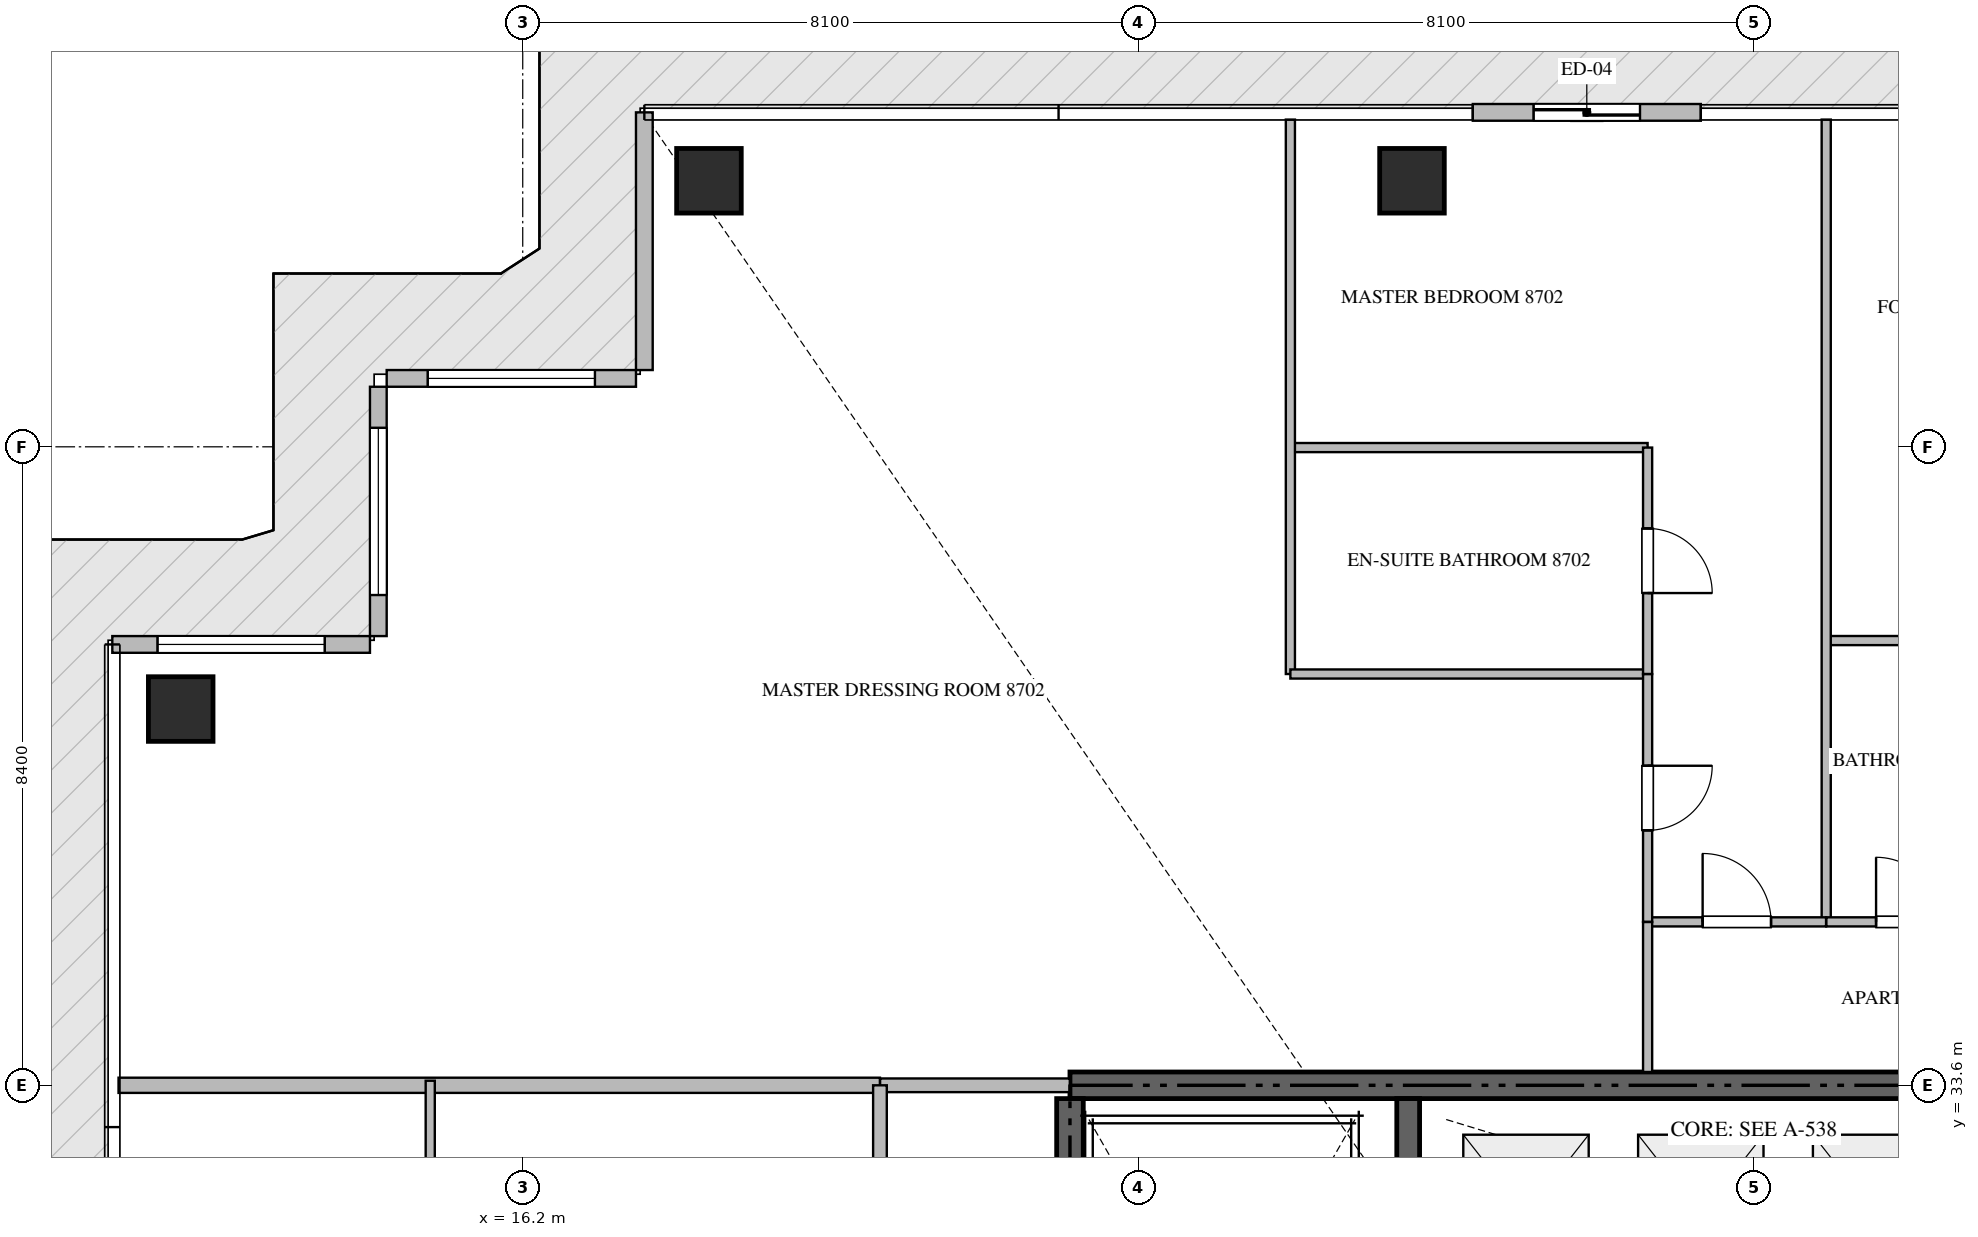
"""IFC4 building model, lengths in metres.
Left out: names, types, materials, properties, quantities, classifications, styles, units other than length and angle.
Written with IfcOpenShell. Run it as: python <this file> out.ifc"""

import sys

from ifc_helpers import new_model, si_unit, direction, frame, frame_2d, origin, origin_2d, place, context, subcontext, project, spatial, rectangle, extrude, source, transform, mapped, element, fill, save


model = new_model("IFC4")
c1 = context("Model", 3, precision=1e-05, world=origin(), true_north=direction((0.0, 1.0)))
c2 = subcontext(c1, "Body", "Model", "MODEL_VIEW")
j1 = project(units=[si_unit("LENGTHUNIT", "METRE"), si_unit("PLANEANGLEUNIT", "RADIAN")], contexts=[c1])
p1 = place(None, origin())
s1 = spatial("IfcSite", under=j1, at=p1, CompositionType="ELEMENT")
p2 = place(p1, origin())
s2 = spatial("IfcBuilding", under=s1, at=p2, CompositionType="ELEMENT")
p3 = place(p2, frame((0.0, 0.0, 353.85)))
s3 = spatial("IfcBuildingStorey", under=s2, at=p3, CompositionType="ELEMENT", Elevation=353.85)
p4 = place(p3, frame((41.4, 33.6, -0.26), z_axis=(0.0, 0.0, 1.0), x_axis=(-1.0, 0.0, 0.0)))
e1 = element("IfcWall", 1, at=p4, inside=s3, PredefinedType="SHEAR", context=c2, shape_type="SweptSolid", body=[
    extrude(rectangle(XDim=18.0, YDim=0.35, at=frame_2d((9.0, 0.0))), origin(), (0.0, 0.0, 1.0), 5.798),
])
p5 = place(p3, frame((23.4, 24.25, -0.26), z_axis=(0.0, 0.0, 1.0), x_axis=(0.0, 1.0, 0.0)))
e2 = element("IfcWall", 2, at=p5, inside=s3, PredefinedType="SHEAR", context=c2, shape_type="SweptSolid", body=[
    extrude(rectangle(XDim=9.175, YDim=0.35, at=frame_2d((4.587, 0.0))), origin(), (0.0, 0.0, 1.0), 5.798),
])
p6 = place(p3, frame((27.85, 23.55, -0.26), z_axis=(0.0, 0.0, 1.0), x_axis=(0.0, 1.0, 0.0)))
e3 = element("IfcWall", 3, at=p6, inside=s3, PredefinedType="SHEAR", context=c2, shape_type="SweptSolid", body=[
    extrude(rectangle(XDim=9.875, YDim=0.3, at=frame_2d((4.938, 0.0))), origin(), (0.0, 0.0, 1.0), 5.798),
])
m1 = source(origin(), c2, "Body", "SweptSolid", [
    extrude(rectangle(XDim=0.85, YDim=0.85, at=origin_2d()), origin(), (0.0, 0.0, 1.0), 5.8),
])
for number, where, z_axis, x_axis in (
    (4, (18.65, 45.5, -0.26), (0.0, 0.0, 1.0), (1.0, 0.0, 0.0)),
    (5, (27.9, 45.5, -0.26), (0.0, 0.0, 1.0), (1.0, 0.0, 0.0)),
    (6, (11.7, 38.55, -0.26), (0.0, 0.0, 1.0), (1.0, 0.0, 0.0)),
):
    element("IfcColumn", number, at=place(p3, frame(where, z_axis=z_axis, x_axis=x_axis)), inside=s3, PredefinedType="COLUMN", context=c2, shape_type="MappedRepresentation", body=[
        mapped(m1, transform((0.0, 0.0, 0.0), scale=1.0)),
    ])
p7 = place(p3, frame((31.7, 46.4, 0.0), z_axis=(0.0, 0.0, 1.0), x_axis=(-1.0, 0.0, 0.0)))
e7 = element("IfcWall", 7, at=p7, inside=s3, PredefinedType="ELEMENTEDWALL", context=c2, shape_type="SweptSolid", body=[
    extrude(rectangle(XDim=3.0, YDim=0.22, at=frame_2d((1.5, 0.0))), origin(), (0.0, 0.0, 1.0), 5.525),
])
p8 = place(p7, frame((0.8, 0.0, 0.0)))
e8 = element("IfcOpeningElement", 8, at=p8, cuts=e7, PredefinedType="OPENING", context=c2, shape_type="SweptSolid", body=[
    extrude(rectangle(XDim=1.4, YDim=2.25, at=frame_2d((0.7, 1.125))), frame((0.0, 0.12, 0.0), z_axis=(0.0, -1.0, 0.0), x_axis=(1.0, 0.0, 0.0)), (0.0, 0.0, 1.0), 0.24),
])
p9 = place(p3, frame((17.8, 46.4, 0.0), z_axis=(0.0, 0.0, 1.0), x_axis=(0.0, -1.0, 0.0)))
e9 = element("IfcWall", 9, at=p9, inside=s3, PredefinedType="ELEMENTEDWALL", context=c2, shape_type="SweptSolid", body=[
    extrude(rectangle(XDim=3.39, YDim=0.22, at=frame_2d((1.695, 0.0))), origin(), (0.0, 0.0, 1.0), 5.525),
])
p10 = place(p3, frame((17.69, 42.9, 0.0), z_axis=(0.0, 0.0, 1.0), x_axis=(-1.0, 0.0, 0.0)))
e10 = element("IfcWall", 10, at=p10, inside=s3, PredefinedType="ELEMENTEDWALL", context=c2, shape_type="SweptSolid", body=[
    extrude(rectangle(XDim=3.28, YDim=0.22, at=frame_2d((1.64, 0.0))), origin(), (0.0, 0.0, 1.0), 5.525),
])
p11 = place(p10, frame((0.54, 0.0, 0.65)))
e11 = element("IfcOpeningElement", 11, at=p11, cuts=e10, PredefinedType="OPENING", context=c2, shape_type="SweptSolid", body=[
    extrude(rectangle(XDim=2.2, YDim=2.4, at=frame_2d((1.1, 1.2))), frame((0.0, 0.12, 0.0), z_axis=(0.0, -1.0, 0.0), x_axis=(1.0, 0.0, 0.0)), (0.0, 0.0, 1.0), 0.24),
])
p12 = place(p3, frame((14.3, 42.79, 0.0), z_axis=(0.0, 0.0, 1.0), x_axis=(0.0, -1.0, 0.0)))
e12 = element("IfcWall", 12, at=p12, inside=s3, PredefinedType="ELEMENTEDWALL", context=c2, shape_type="SweptSolid", body=[
    extrude(rectangle(XDim=3.28, YDim=0.22, at=frame_2d((1.64, 0.0))), origin(), (0.0, 0.0, 1.0), 5.525),
])
p13 = place(p12, frame((0.54, 0.0, 0.65)))
e13 = element("IfcOpeningElement", 13, at=p13, cuts=e12, PredefinedType="OPENING", context=c2, shape_type="SweptSolid", body=[
    extrude(rectangle(XDim=2.2, YDim=2.4, at=frame_2d((1.1, 1.2))), frame((0.0, 0.12, 0.0), z_axis=(0.0, -1.0, 0.0), x_axis=(1.0, 0.0, 0.0)), (0.0, 0.0, 1.0), 0.24),
])
p14 = place(p3, frame((14.19, 39.4, 0.0), z_axis=(0.0, 0.0, 1.0), x_axis=(-1.0, 0.0, 0.0)))
e14 = element("IfcWall", 14, at=p14, inside=s3, PredefinedType="ELEMENTEDWALL", context=c2, shape_type="SweptSolid", body=[
    extrude(rectangle(XDim=3.39, YDim=0.22, at=frame_2d((1.695, 0.0))), origin(), (0.0, 0.0, 1.0), 5.525),
])
p15 = place(p14, frame((0.595, 0.0, 0.65)))
e15 = element("IfcOpeningElement", 15, at=p15, cuts=e14, PredefinedType="OPENING", context=c2, shape_type="SweptSolid", body=[
    extrude(rectangle(XDim=2.2, YDim=2.4, at=frame_2d((1.1, 1.2))), frame((0.0, 0.12, 0.0), z_axis=(0.0, -1.0, 0.0), x_axis=(1.0, 0.0, 0.0)), (0.0, 0.0, 1.0), 0.24),
])
p16 = place(p3, frame((10.882, 33.6, 0.0), z_axis=(0.0, 0.0, 1.0), x_axis=(1.0, 0.0, 0.0)))
e16 = element("IfcWall", 16, at=p16, inside=s3, PredefinedType="PARTITIONING", context=c2, shape_type="SweptSolid", body=[
    extrude(rectangle(XDim=10.018, YDim=0.2, at=frame_2d((5.009, 0.0))), origin(), (0.0, 0.0, 1.0), 5.54),
])
p17 = place(p3, frame((20.902, 33.6, 0.0), z_axis=(0.0, 0.0, 1.0), x_axis=(1.0, 0.0, 0.0)))
e17 = element("IfcWall", 17, at=p17, inside=s3, PredefinedType="PARTITIONING", context=c2, shape_type="SweptSolid", body=[
    extrude(rectangle(XDim=2.496, YDim=0.18, at=frame_2d((1.248, 0.0))), origin(), (0.0, 0.0, 1.0), 5.54),
])
p18 = place(p3, frame((20.9, 16.8, 0.0), z_axis=(0.0, 0.0, 1.0), x_axis=(0.0, 1.0, 0.0)))
e18 = element("IfcWall", 18, at=p18, inside=s3, PredefinedType="PARTITIONING", context=c2, shape_type="SweptSolid", body=[
    extrude(rectangle(XDim=16.8, YDim=0.18, at=frame_2d((8.4, 0.0))), origin(), (0.0, 0.0, 1.0), 5.54),
])
p19 = place(p18, frame((1.3, 0.0, 0.0)))
e19 = element("IfcOpeningElement", 19, at=p19, cuts=e18, PredefinedType="OPENING", context=c2, shape_type="SweptSolid", body=[
    extrude(rectangle(XDim=1.0, YDim=2.15, at=frame_2d((0.5, 1.075))), frame((0.0, 0.1, 0.0), z_axis=(0.0, -1.0, 0.0), x_axis=(1.0, 0.0, 0.0)), (0.0, 0.0, 1.0), 0.2),
])
p20 = place(p3, frame((33.35, 39.451, 0.0), z_axis=(0.0, 0.0, 1.0), x_axis=(1.0, 0.0, 0.0)))
e20 = element("IfcWall", 20, at=p20, inside=s3, PredefinedType="PARTITIONING", context=c2, shape_type="SweptSolid", body=[
    extrude(rectangle(XDim=5.15, YDim=0.12, at=frame_2d((2.575, 0.0))), origin(), (0.0, 0.0, 1.0), 5.54),
])
p21 = place(p3, frame((33.35, 46.305, 0.0), z_axis=(0.0, 0.0, 1.0), x_axis=(0.0, -1.0, 0.0)))
e21 = element("IfcWall", 21, at=p21, inside=s3, PredefinedType="PARTITIONING", context=c2, shape_type="SweptSolid", body=[
    extrude(rectangle(XDim=10.555, YDim=0.12, at=frame_2d((5.277, 0.0))), origin(), (0.0, 0.0, 1.0), 5.54),
])
p22 = place(p3, frame((33.35, 35.75, 0.0), z_axis=(0.0, 0.0, 1.0), x_axis=(1.0, 0.0, 0.0)))
e22 = element("IfcWall", 22, at=p22, inside=s3, PredefinedType="PARTITIONING", context=c2, shape_type="SweptSolid", body=[
    extrude(rectangle(XDim=2.163, YDim=0.12, at=frame_2d((1.082, 0.0))), origin(), (0.0, 0.0, 1.0), 5.54),
])
p23 = place(p22, frame((0.656, 0.0, 0.0)))
e23 = element("IfcOpeningElement", 23, at=p23, cuts=e22, PredefinedType="OPENING", context=c2, shape_type="SweptSolid", body=[
    extrude(rectangle(XDim=0.85, YDim=2.1, at=frame_2d((0.425, 1.05))), frame((0.0, 0.07, 0.0), z_axis=(0.0, -1.0, 0.0), x_axis=(1.0, 0.0, 0.0)), (0.0, 0.0, 1.0), 0.14),
])
p24 = place(p3, frame((31.0, 35.75, 0.0), z_axis=(0.0, 0.0, 1.0), x_axis=(1.0, 0.0, 0.0)))
e24 = element("IfcWall", 24, at=p24, inside=s3, PredefinedType="PARTITIONING", context=c2, shape_type="SweptSolid", body=[
    extrude(rectangle(XDim=2.348, YDim=0.12, at=frame_2d((1.174, 0.0))), origin(), (0.0, 0.0, 1.0), 5.54),
])
p25 = place(p24, frame((0.724, 0.0, 0.0)))
e25 = element("IfcOpeningElement", 25, at=p25, cuts=e24, PredefinedType="OPENING", context=c2, shape_type="SweptSolid", body=[
    extrude(rectangle(XDim=0.9, YDim=2.1, at=frame_2d((0.45, 1.05))), frame((0.0, 0.07, 0.0), z_axis=(0.0, -1.0, 0.0), x_axis=(1.0, 0.0, 0.0)), (0.0, 0.0, 1.0), 0.14),
])
p26 = place(p3, frame((26.3, 41.99, 0.0), z_axis=(0.0, 0.0, 1.0), x_axis=(1.0, 0.0, 0.0)))
e26 = element("IfcWall", 26, at=p26, inside=s3, PredefinedType="PARTITIONING", context=c2, shape_type="SweptSolid", body=[
    extrude(rectangle(XDim=4.7, YDim=0.12, at=frame_2d((2.35, 0.0))), origin(), (0.0, 0.0, 1.0), 5.54),
])
p27 = place(p3, frame((26.3, 46.305, 0.0), z_axis=(0.0, 0.0, 1.0), x_axis=(0.0, -1.0, 0.0)))
e27 = element("IfcWall", 27, at=p27, inside=s3, PredefinedType="PARTITIONING", context=c2, shape_type="SweptSolid", body=[
    extrude(rectangle(XDim=7.294, YDim=0.12, at=frame_2d((3.647, 0.0))), origin(), (0.0, 0.0, 1.0), 5.54),
])
p28 = place(p3, frame((26.3, 39.011, 0.0), z_axis=(0.0, 0.0, 1.0), x_axis=(1.0, 0.0, 0.0)))
e28 = element("IfcWall", 28, at=p28, inside=s3, PredefinedType="PARTITIONING", context=c2, shape_type="SweptSolid", body=[
    extrude(rectangle(XDim=4.7, YDim=0.12, at=frame_2d((2.35, 0.0))), origin(), (0.0, 0.0, 1.0), 5.54),
])
p29 = place(p3, frame((31.0, 41.99, 0.0), z_axis=(0.0, 0.0, 1.0), x_axis=(0.0, -1.0, 0.0)))
e29 = element("IfcWall", 29, at=p29, inside=s3, PredefinedType="PARTITIONING", context=c2, shape_type="SweptSolid", body=[
    extrude(rectangle(XDim=2.979, YDim=0.12, at=frame_2d((1.49, 0.0))), origin(), (0.0, 0.0, 1.0), 5.54),
])
p30 = place(p29, frame((1.064, 0.0, 0.0)))
e30 = element("IfcOpeningElement", 30, at=p30, cuts=e29, PredefinedType="OPENING", context=c2, shape_type="SweptSolid", body=[
    extrude(rectangle(XDim=0.85, YDim=2.1, at=frame_2d((0.425, 1.05))), frame((0.0, 0.07, 0.0), z_axis=(0.0, -1.0, 0.0), x_axis=(1.0, 0.0, 0.0)), (0.0, 0.0, 1.0), 0.14),
])
p31 = place(p3, frame((31.0, 39.009, 0.0), z_axis=(0.0, 0.0, 1.0), x_axis=(0.0, -1.0, 0.0)))
e31 = element("IfcWall", 31, at=p31, inside=s3, PredefinedType="PARTITIONING", context=c2, shape_type="SweptSolid", body=[
    extrude(rectangle(XDim=3.259, YDim=0.12, at=frame_2d((1.629, 0.0))), origin(), (0.0, 0.0, 1.0), 5.54),
])
p32 = place(p31, frame((1.205, 0.0, 0.0)))
e32 = element("IfcOpeningElement", 32, at=p32, cuts=e31, PredefinedType="OPENING", context=c2, shape_type="SweptSolid", body=[
    extrude(rectangle(XDim=0.85, YDim=2.1, at=frame_2d((0.425, 1.05))), frame((0.0, 0.07, 0.0), z_axis=(0.0, -1.0, 0.0), x_axis=(1.0, 0.0, 0.0)), (0.0, 0.0, 1.0), 0.14),
])
p33 = place(p3, frame((31.0, 35.748, 0.0), z_axis=(0.0, 0.0, 1.0), x_axis=(0.0, -1.0, 0.0)))
e33 = element("IfcWall", 33, at=p33, inside=s3, PredefinedType="PARTITIONING", context=c2, shape_type="SweptSolid", body=[
    extrude(rectangle(XDim=1.973, YDim=0.12, at=frame_2d((0.987, 0.0))), origin(), (0.0, 0.0, 1.0), 5.54),
])
p34 = place(p3, frame((14.983, 23.18, 0.0), z_axis=(0.0, 0.0, 1.0), x_axis=(0.0, 1.0, 0.0)))
e34 = element("IfcWall", 34, at=p34, inside=s3, PredefinedType="PARTITIONING", context=c2, shape_type="SweptSolid", body=[
    extrude(rectangle(XDim=10.48, YDim=0.12, at=frame_2d((5.24, 0.0))), origin(), (0.0, 0.0, 1.0), 5.54),
])
m2 = source(origin(), c2, "Body", "SweptSolid", [
    extrude(rectangle(XDim=1.4, YDim=2.25, at=frame_2d((0.7, 1.125))), frame((0.0, 0.025, 0.0), z_axis=(0.0, -1.0, 0.0), x_axis=(1.0, 0.0, 0.0)), (0.0, 0.0, 1.0), 0.05),
])
p35 = place(p8, origin())
e35 = element("IfcDoor", 35, at=p35, inside=s3, OperationType="SLIDING_TO_LEFT", PredefinedType="DOOR", context=c2, shape_type="MappedRepresentation", body=[
    mapped(m2, transform((0.0, 0.0, 0.0), scale=1.0)),
])
fill(e8, e35)
m3 = source(origin(), c2, "Body", "SweptSolid", [
    extrude(rectangle(XDim=2.2, YDim=2.4, at=frame_2d((1.1, 1.2))), frame((0.0, 0.03, 0.0), z_axis=(0.0, -1.0, 0.0), x_axis=(1.0, 0.0, 0.0)), (0.0, 0.0, 1.0), 0.06),
])
p36 = place(p11, origin())
e36 = element("IfcWindow", 36, at=p36, inside=s3, PartitioningType="SINGLE_PANEL", PredefinedType="WINDOW", context=c2, shape_type="MappedRepresentation", body=[
    mapped(m3, transform((0.0, 0.0, 0.0), scale=1.0)),
])
fill(e11, e36)
p37 = place(p13, origin())
e37 = element("IfcWindow", 37, at=p37, inside=s3, PartitioningType="SINGLE_PANEL", PredefinedType="WINDOW", context=c2, shape_type="MappedRepresentation", body=[
    mapped(m3, transform((0.0, 0.0, 0.0), scale=1.0)),
])
fill(e13, e37)
p38 = place(p15, origin())
e38 = element("IfcWindow", 38, at=p38, inside=s3, PartitioningType="SINGLE_PANEL", PredefinedType="WINDOW", context=c2, shape_type="MappedRepresentation", body=[
    mapped(m3, transform((0.0, 0.0, 0.0), scale=1.0)),
])
fill(e15, e38)
m4 = source(origin(), c2, "Body", "SweptSolid", [
    extrude(rectangle(XDim=0.85, YDim=2.1, at=frame_2d((0.425, 1.05))), frame((0.0, 0.025, 0.0), z_axis=(0.0, -1.0, 0.0), x_axis=(1.0, 0.0, 0.0)), (0.0, 0.0, 1.0), 0.05),
])
p39 = place(p23, origin())
e39 = element("IfcDoor", 39, at=p39, inside=s3, OperationType="SINGLE_SWING_LEFT", PredefinedType="DOOR", context=c2, shape_type="MappedRepresentation", body=[
    mapped(m4, transform((0.0, 0.0, 0.0), scale=1.0)),
])
fill(e23, e39)
m5 = source(origin(), c2, "Body", "SweptSolid", [
    extrude(rectangle(XDim=0.9, YDim=2.1, at=frame_2d((0.45, 1.05))), frame((0.0, 0.025, 0.0), z_axis=(0.0, -1.0, 0.0), x_axis=(1.0, 0.0, 0.0)), (0.0, 0.0, 1.0), 0.05),
])
p40 = place(p25, origin())
e40 = element("IfcDoor", 40, at=p40, inside=s3, OperationType="SINGLE_SWING_LEFT", PredefinedType="DOOR", context=c2, shape_type="MappedRepresentation", body=[
    mapped(m5, transform((0.0, 0.0, 0.0), scale=1.0)),
])
fill(e25, e40)
p41 = place(p30, origin())
e41 = element("IfcDoor", 41, at=p41, inside=s3, OperationType="SINGLE_SWING_RIGHT", PredefinedType="DOOR", context=c2, shape_type="MappedRepresentation", body=[
    mapped(m4, transform((0.0, 0.0, 0.0), scale=1.0)),
])
fill(e30, e41)
p42 = place(p32, origin())
e42 = element("IfcDoor", 42, at=p42, inside=s3, OperationType="SINGLE_SWING_LEFT", PredefinedType="DOOR", context=c2, shape_type="MappedRepresentation", body=[
    mapped(m4, transform((0.0, 0.0, 0.0), scale=1.0)),
])
fill(e32, e42)
save(model, sys.argv[1])
